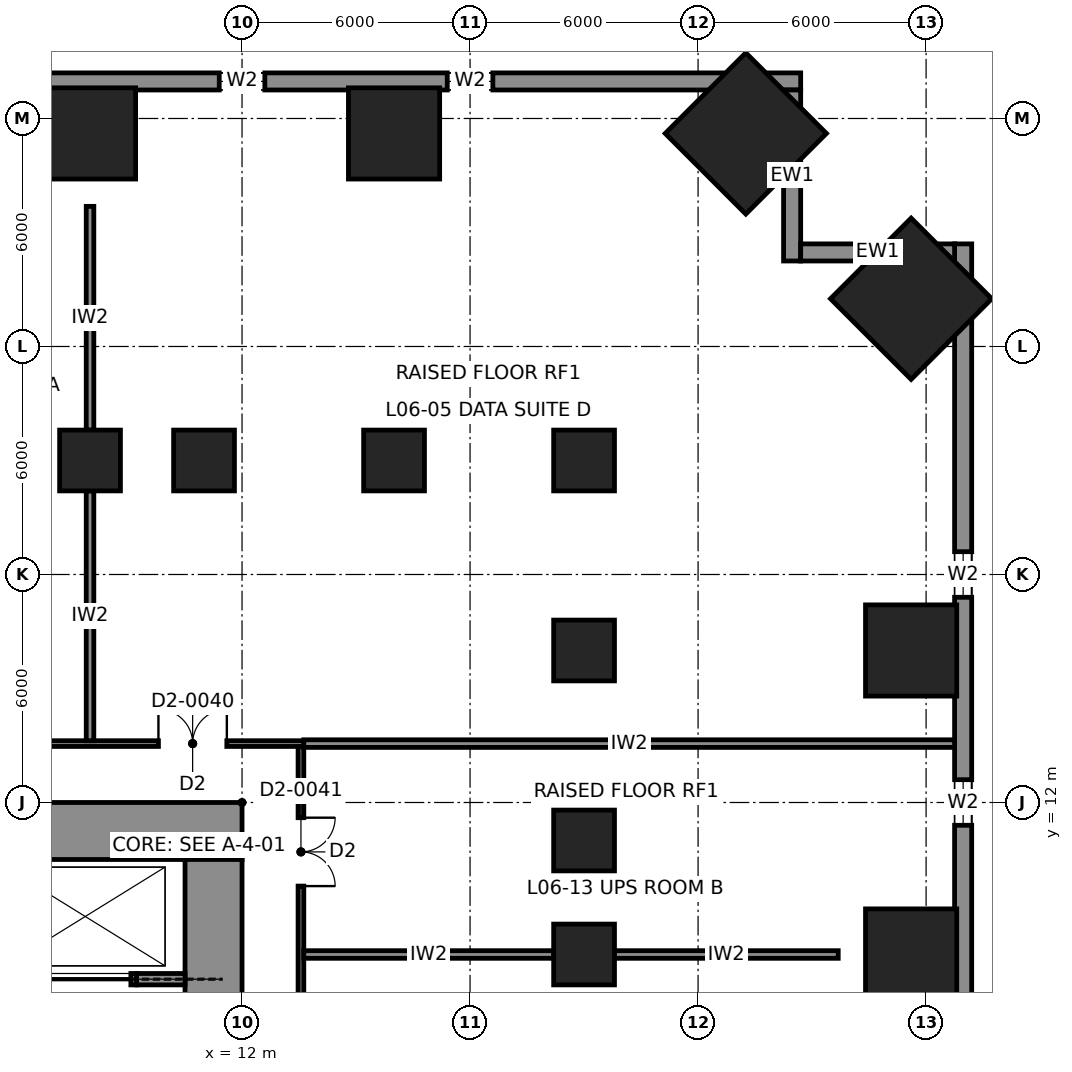
"""IFC4 building model, lengths in metres.
Left out: names, types, materials, properties, quantities, classifications, styles, units other than length and angle.
Written with IfcOpenShell. Run it as: python <this file> out.ifc"""

import sys

from ifc_helpers import new_model, si_unit, direction, frame, frame_2d, origin, origin_2d, place, context, subcontext, project, spatial, rectangle, extrude, element, fill, save


model = new_model("IFC4")
c1 = context("Model", 3, precision=1e-05, world=origin(), true_north=direction((0.0, 1.0)))
c2 = subcontext(c1, "Body", "Model", "MODEL_VIEW")
j1 = project(units=[si_unit("LENGTHUNIT", "METRE"), si_unit("PLANEANGLEUNIT", "RADIAN")], contexts=[c1])
p1 = place(None, origin())
s1 = spatial("IfcSite", under=j1, at=p1, CompositionType="ELEMENT")
p2 = place(p1, origin())
s2 = spatial("IfcBuilding", under=s1, at=p2, CompositionType="ELEMENT")
p3 = place(p2, frame((0.0, 0.0, 32.0)))
s3 = spatial("IfcBuildingStorey", under=s2, at=p3, CompositionType="ELEMENT", Elevation=32.0)
for number, where, z_axis, x_axis in (
    (1, (25.256, 29.606, 0.0), (-0.04, -0.04, 0.998), (0.707, -0.707, 0.0)),
    (2, (29.606, 25.256, 0.0), (-0.04, -0.04, 0.998), (0.707, -0.707, 0.0)),
):
    element("IfcColumn", number, at=place(p3, frame(where, z_axis=z_axis, x_axis=x_axis)), inside=s3, PredefinedType="COLUMN", context=c2, shape_type="SweptSolid", body=[
        extrude(rectangle(XDim=3.0, YDim=3.0, at=origin_2d()), origin(), (0.0, 0.0, 1.0), 5.509),
    ])
for number, where, z_axis, x_axis in (
    (3, (8.0, 29.606, 0.0), (0.0, -0.04, 0.999), (1.0, 0.0, 0.0)),
    (4, (16.0, 29.606, 0.0), (0.0, -0.04, 0.999), (1.0, 0.0, 0.0)),
    (5, (29.606, 8.0, 0.0), (-0.04, 0.0, 0.999), (0.0, -1.0, 0.0)),
    (6, (29.606, 16.0, 0.0), (-0.04, 0.0, 0.999), (0.0, -1.0, 0.0)),
):
    element("IfcColumn", number, at=place(p3, frame(where, z_axis=z_axis, x_axis=x_axis)), inside=s3, PredefinedType="COLUMN", context=c2, shape_type="SweptSolid", body=[
        extrude(rectangle(XDim=2.4, YDim=2.4, at=origin_2d()), origin(), (0.0, 0.0, 1.0), 5.504),
    ])
for number, where, z_axis, x_axis in (
    (7, (8.0, 21.0, 0.0), (0.0, 0.0, 1.0), (1.0, 0.0, 0.0)),
    (8, (11.0, 21.0, 0.0), (0.0, 0.0, 1.0), (1.0, 0.0, 0.0)),
    (9, (16.0, 21.0, 0.0), (0.0, 0.0, 1.0), (1.0, 0.0, 0.0)),
    (10, (21.0, 8.0, 0.0), (0.0, 0.0, 1.0), (1.0, 0.0, 0.0)),
    (11, (21.0, 11.0, 0.0), (0.0, 0.0, 1.0), (1.0, 0.0, 0.0)),
    (12, (21.0, 16.0, 0.0), (0.0, 0.0, 1.0), (1.0, 0.0, 0.0)),
    (13, (21.0, 21.0, 0.0), (0.0, 0.0, 1.0), (1.0, 0.0, 0.0)),
):
    element("IfcColumn", number, at=place(p3, frame(where, z_axis=z_axis, x_axis=x_axis)), inside=s3, PredefinedType="COLUMN", context=c2, shape_type="SweptSolid", body=[
        extrude(rectangle(XDim=1.6, YDim=1.6, at=origin_2d()), origin(), (0.0, 0.0, 1.0), 5.5),
    ])
p4 = place(p3, frame((-12.0, 11.25, 0.0), z_axis=(0.0, 0.0, 1.0), x_axis=(1.0, 0.0, 0.0)))
e14 = element("IfcWall", 14, at=p4, inside=s3, PredefinedType="SHEAR", context=c2, shape_type="SweptSolid", body=[
    extrude(rectangle(XDim=24.0, YDim=1.5, at=frame_2d((12.0, 0.0))), origin(), (0.0, 0.0, 1.0), 5.5),
])
p5 = place(p3, frame((11.25, 10.5, 0.0), z_axis=(0.0, 0.0, 1.0), x_axis=(0.0, -1.0, 0.0)))
e15 = element("IfcWall", 15, at=p5, inside=s3, PredefinedType="SHEAR", context=c2, shape_type="SweptSolid", body=[
    extrude(rectangle(XDim=21.0, YDim=1.5, at=frame_2d((10.5, 0.0))), origin(), (0.0, 0.0, 1.0), 5.5),
])
p6 = place(p5, frame((3.7, 0.0, 0.0)))
e16 = element("IfcOpeningElement", 16, at=p6, cuts=e15, PredefinedType="OPENING", context=c2, shape_type="SweptSolid", body=[
    extrude(rectangle(XDim=1.2, YDim=2.3, at=frame_2d((0.6, 1.15))), frame((0.0, 0.76, 0.0), z_axis=(0.0, -1.0, 0.0), x_axis=(1.0, 0.0, 0.0)), (0.0, 0.0, 1.0), 1.52),
])
p7 = place(p5, frame((16.1, 0.0, 0.0)))
e17 = element("IfcOpeningElement", 17, at=p7, cuts=e15, PredefinedType="OPENING", context=c2, shape_type="SweptSolid", body=[
    extrude(rectangle(XDim=1.2, YDim=2.3, at=frame_2d((0.6, 1.15))), frame((0.0, 0.76, 0.0), z_axis=(0.0, -1.0, 0.0), x_axis=(1.0, 0.0, 0.0)), (0.0, 0.0, 1.0), 1.52),
])
p8 = place(p3, frame((9.225, 7.35, 0.0), z_axis=(0.0, 0.0, 1.0), x_axis=(1.0, 0.0, 0.0)))
e18 = element("IfcWall", 18, at=p8, inside=s3, PredefinedType="SHEAR", context=c2, shape_type="SweptSolid", body=[
    extrude(rectangle(XDim=1.275, YDim=0.3, at=frame_2d((0.637, 0.0))), origin(), (0.0, 0.0, 1.0), 5.5),
])
p9 = place(p3, frame((6.525, 7.35, 0.0), z_axis=(0.0, 0.0, 1.0), x_axis=(1.0, 0.0, 0.0)))
e19 = element("IfcWall", 19, at=p9, inside=s3, PredefinedType="PARTITIONING", context=c2, shape_type="SweptSolid", body=[
    extrude(rectangle(XDim=2.7, YDim=0.3, at=frame_2d((1.35, 0.0))), origin(), (0.0, 0.0, 1.0), 5.5),
])
p10 = place(p9, frame((0.15, 0.0, 0.0)))
e20 = element("IfcOpeningElement", 20, at=p10, cuts=e19, PredefinedType="OPENING", context=c2, shape_type="SweptSolid", body=[
    extrude(rectangle(XDim=2.4, YDim=2.3, at=frame_2d((1.2, 1.15))), frame((0.0, 0.16, 0.0), z_axis=(0.0, -1.0, 0.0), x_axis=(1.0, 0.0, 0.0)), (0.0, 0.0, 1.0), 0.32),
])
p11 = place(p3, frame((26.7, 30.975, 0.0), z_axis=(0.0, 0.0, 1.0), x_axis=(-1.0, 0.0, 0.0)))
e21 = element("IfcWall", 21, at=p11, inside=s3, PredefinedType="SOLIDWALL", context=c2, shape_type="SweptSolid", body=[
    extrude(rectangle(XDim=53.4, YDim=0.45, at=frame_2d((26.7, 0.0))), origin(), (0.0, 0.0, 1.0), 5.3),
])
p12 = place(p11, frame((8.1, 0.0, 0.9)))
e22 = element("IfcOpeningElement", 22, at=p12, cuts=e21, PredefinedType="OPENING", context=c2, shape_type="SweptSolid", body=[
    extrude(rectangle(XDim=1.2, YDim=2.0, at=frame_2d((0.6, 1.0))), frame((0.0, 0.235, 0.0), z_axis=(0.0, -1.0, 0.0), x_axis=(1.0, 0.0, 0.0)), (0.0, 0.0, 1.0), 0.47),
])
p13 = place(p11, frame((14.1, 0.0, 0.9)))
e23 = element("IfcOpeningElement", 23, at=p13, cuts=e21, PredefinedType="OPENING", context=c2, shape_type="SweptSolid", body=[
    extrude(rectangle(XDim=1.2, YDim=2.0, at=frame_2d((0.6, 1.0))), frame((0.0, 0.235, 0.0), z_axis=(0.0, -1.0, 0.0), x_axis=(1.0, 0.0, 0.0)), (0.0, 0.0, 1.0), 0.47),
])
p14 = place(p11, frame((20.1, 0.0, 0.9)))
e24 = element("IfcOpeningElement", 24, at=p14, cuts=e21, PredefinedType="OPENING", context=c2, shape_type="SweptSolid", body=[
    extrude(rectangle(XDim=1.2, YDim=2.0, at=frame_2d((0.6, 1.0))), frame((0.0, 0.235, 0.0), z_axis=(0.0, -1.0, 0.0), x_axis=(1.0, 0.0, 0.0)), (0.0, 0.0, 1.0), 0.47),
])
p15 = place(p11, frame((32.1, 0.0, 0.9)))
e25 = element("IfcOpeningElement", 25, at=p15, cuts=e21, PredefinedType="OPENING", context=c2, shape_type="SweptSolid", body=[
    extrude(rectangle(XDim=1.2, YDim=2.0, at=frame_2d((0.6, 1.0))), frame((0.0, 0.235, 0.0), z_axis=(0.0, -1.0, 0.0), x_axis=(1.0, 0.0, 0.0)), (0.0, 0.0, 1.0), 0.47),
])
p16 = place(p11, frame((38.1, 0.0, 0.9)))
e26 = element("IfcOpeningElement", 26, at=p16, cuts=e21, PredefinedType="OPENING", context=c2, shape_type="SweptSolid", body=[
    extrude(rectangle(XDim=1.2, YDim=2.0, at=frame_2d((0.6, 1.0))), frame((0.0, 0.235, 0.0), z_axis=(0.0, -1.0, 0.0), x_axis=(1.0, 0.0, 0.0)), (0.0, 0.0, 1.0), 0.47),
])
p17 = place(p11, frame((44.1, 0.0, 0.9)))
e27 = element("IfcOpeningElement", 27, at=p17, cuts=e21, PredefinedType="OPENING", context=c2, shape_type="SweptSolid", body=[
    extrude(rectangle(XDim=1.2, YDim=2.0, at=frame_2d((0.6, 1.0))), frame((0.0, 0.235, 0.0), z_axis=(0.0, -1.0, 0.0), x_axis=(1.0, 0.0, 0.0)), (0.0, 0.0, 1.0), 0.47),
])
p18 = place(p3, frame((30.975, -26.7, 0.0), z_axis=(0.0, 0.0, 1.0), x_axis=(0.0, 1.0, 0.0)))
e28 = element("IfcWall", 28, at=p18, inside=s3, PredefinedType="SOLIDWALL", context=c2, shape_type="SweptSolid", body=[
    extrude(rectangle(XDim=53.4, YDim=0.45, at=frame_2d((26.7, 0.0))), origin(), (0.0, 0.0, 1.0), 5.3),
])
p19 = place(p18, frame((8.1, 0.0, 0.9)))
e29 = element("IfcOpeningElement", 29, at=p19, cuts=e28, PredefinedType="OPENING", context=c2, shape_type="SweptSolid", body=[
    extrude(rectangle(XDim=1.2, YDim=2.0, at=frame_2d((0.6, 1.0))), frame((0.0, 0.235, 0.0), z_axis=(0.0, -1.0, 0.0), x_axis=(1.0, 0.0, 0.0)), (0.0, 0.0, 1.0), 0.47),
])
p20 = place(p18, frame((14.1, 0.0, 0.9)))
e30 = element("IfcOpeningElement", 30, at=p20, cuts=e28, PredefinedType="OPENING", context=c2, shape_type="SweptSolid", body=[
    extrude(rectangle(XDim=1.2, YDim=2.0, at=frame_2d((0.6, 1.0))), frame((0.0, 0.235, 0.0), z_axis=(0.0, -1.0, 0.0), x_axis=(1.0, 0.0, 0.0)), (0.0, 0.0, 1.0), 0.47),
])
p21 = place(p18, frame((20.1, 0.0, 0.9)))
e31 = element("IfcOpeningElement", 31, at=p21, cuts=e28, PredefinedType="OPENING", context=c2, shape_type="SweptSolid", body=[
    extrude(rectangle(XDim=1.2, YDim=2.0, at=frame_2d((0.6, 1.0))), frame((0.0, 0.235, 0.0), z_axis=(0.0, -1.0, 0.0), x_axis=(1.0, 0.0, 0.0)), (0.0, 0.0, 1.0), 0.47),
])
p22 = place(p18, frame((32.1, 0.0, 0.9)))
e32 = element("IfcOpeningElement", 32, at=p22, cuts=e28, PredefinedType="OPENING", context=c2, shape_type="SweptSolid", body=[
    extrude(rectangle(XDim=1.2, YDim=2.0, at=frame_2d((0.6, 1.0))), frame((0.0, 0.235, 0.0), z_axis=(0.0, -1.0, 0.0), x_axis=(1.0, 0.0, 0.0)), (0.0, 0.0, 1.0), 0.47),
])
p23 = place(p18, frame((38.1, 0.0, 0.9)))
e33 = element("IfcOpeningElement", 33, at=p23, cuts=e28, PredefinedType="OPENING", context=c2, shape_type="SweptSolid", body=[
    extrude(rectangle(XDim=1.2, YDim=2.0, at=frame_2d((0.6, 1.0))), frame((0.0, 0.235, 0.0), z_axis=(0.0, -1.0, 0.0), x_axis=(1.0, 0.0, 0.0)), (0.0, 0.0, 1.0), 0.47),
])
p24 = place(p18, frame((44.1, 0.0, 0.9)))
e34 = element("IfcOpeningElement", 34, at=p24, cuts=e28, PredefinedType="OPENING", context=c2, shape_type="SweptSolid", body=[
    extrude(rectangle(XDim=1.2, YDim=2.0, at=frame_2d((0.6, 1.0))), frame((0.0, 0.235, 0.0), z_axis=(0.0, -1.0, 0.0), x_axis=(1.0, 0.0, 0.0)), (0.0, 0.0, 1.0), 0.47),
])
p25 = place(p3, frame((26.475, 26.25, 0.0), z_axis=(0.0, 0.0, 1.0), x_axis=(0.0, 1.0, 0.0)))
e35 = element("IfcWall", 35, at=p25, inside=s3, PredefinedType="SOLIDWALL", context=c2, shape_type="SweptSolid", body=[
    extrude(rectangle(XDim=4.5, YDim=0.45, at=frame_2d((2.25, 0.0))), origin(), (0.0, 0.0, 1.0), 5.3),
])
p26 = place(p3, frame((26.7, 26.475, 0.0), z_axis=(0.0, 0.0, 1.0), x_axis=(1.0, 0.0, 0.0)))
e36 = element("IfcWall", 36, at=p26, inside=s3, PredefinedType="SOLIDWALL", context=c2, shape_type="SweptSolid", body=[
    extrude(rectangle(XDim=4.05, YDim=0.45, at=frame_2d((2.025, 0.0))), origin(), (0.0, 0.0, 1.0), 5.3),
])
p27 = place(p3, frame((-13.625, 13.55, 0.0), z_axis=(0.0, 0.0, 1.0), x_axis=(1.0, 0.0, 0.0)))
e37 = element("IfcWall", 37, at=p27, inside=s3, PredefinedType="PARTITIONING", context=c2, shape_type="SweptSolid", body=[
    extrude(rectangle(XDim=27.25, YDim=0.15, at=frame_2d((13.625, 0.0))), origin(), (0.0, 0.0, 1.0), 5.3),
])
p28 = place(p27, frame((2.025, 0.0, 0.0)))
e38 = element("IfcOpeningElement", 38, at=p28, cuts=e37, PredefinedType="OPENING", context=c2, shape_type="SweptSolid", body=[
    extrude(rectangle(XDim=1.8, YDim=2.3, at=frame_2d((0.9, 1.15))), frame((0.0, 0.085, 0.0), z_axis=(0.0, -1.0, 0.0), x_axis=(1.0, 0.0, 0.0)), (0.0, 0.0, 1.0), 0.17),
])
p29 = place(p27, frame((7.225, 0.0, 0.0)))
e39 = element("IfcOpeningElement", 39, at=p29, cuts=e37, PredefinedType="OPENING", context=c2, shape_type="SweptSolid", body=[
    extrude(rectangle(XDim=1.8, YDim=2.3, at=frame_2d((0.9, 1.15))), frame((0.0, 0.085, 0.0), z_axis=(0.0, -1.0, 0.0), x_axis=(1.0, 0.0, 0.0)), (0.0, 0.0, 1.0), 0.17),
])
p30 = place(p27, frame((12.725, 0.0, 0.0)))
e40 = element("IfcOpeningElement", 40, at=p30, cuts=e37, PredefinedType="OPENING", context=c2, shape_type="SweptSolid", body=[
    extrude(rectangle(XDim=1.8, YDim=2.3, at=frame_2d((0.9, 1.15))), frame((0.0, 0.085, 0.0), z_axis=(0.0, -1.0, 0.0), x_axis=(1.0, 0.0, 0.0)), (0.0, 0.0, 1.0), 0.17),
])
p31 = place(p27, frame((18.225, 0.0, 0.0)))
e41 = element("IfcOpeningElement", 41, at=p31, cuts=e37, PredefinedType="OPENING", context=c2, shape_type="SweptSolid", body=[
    extrude(rectangle(XDim=1.8, YDim=2.3, at=frame_2d((0.9, 1.15))), frame((0.0, 0.085, 0.0), z_axis=(0.0, -1.0, 0.0), x_axis=(1.0, 0.0, 0.0)), (0.0, 0.0, 1.0), 0.17),
])
p32 = place(p27, frame((23.425, 0.0, 0.0)))
e42 = element("IfcOpeningElement", 42, at=p32, cuts=e37, PredefinedType="OPENING", context=c2, shape_type="SweptSolid", body=[
    extrude(rectangle(XDim=1.8, YDim=2.3, at=frame_2d((0.9, 1.15))), frame((0.0, 0.085, 0.0), z_axis=(0.0, -1.0, 0.0), x_axis=(1.0, 0.0, 0.0)), (0.0, 0.0, 1.0), 0.17),
])
p33 = place(p3, frame((13.55, -13.475, 0.0), z_axis=(0.0, 0.0, 1.0), x_axis=(0.0, 1.0, 0.0)))
e43 = element("IfcWall", 43, at=p33, inside=s3, PredefinedType="PARTITIONING", context=c2, shape_type="SweptSolid", body=[
    extrude(rectangle(XDim=26.95, YDim=0.15, at=frame_2d((13.475, 0.0))), origin(), (0.0, 0.0, 1.0), 5.3),
])
p34 = place(p33, frame((1.875, 0.0, 0.0)))
e44 = element("IfcOpeningElement", 44, at=p34, cuts=e43, PredefinedType="OPENING", context=c2, shape_type="SweptSolid", body=[
    extrude(rectangle(XDim=1.8, YDim=2.3, at=frame_2d((0.9, 1.15))), frame((0.0, 0.085, 0.0), z_axis=(0.0, -1.0, 0.0), x_axis=(1.0, 0.0, 0.0)), (0.0, 0.0, 1.0), 0.17),
])
p35 = place(p33, frame((12.575, 0.0, 0.0)))
e45 = element("IfcOpeningElement", 45, at=p35, cuts=e43, PredefinedType="OPENING", context=c2, shape_type="SweptSolid", body=[
    extrude(rectangle(XDim=1.8, YDim=2.3, at=frame_2d((0.9, 1.15))), frame((0.0, 0.085, 0.0), z_axis=(0.0, -1.0, 0.0), x_axis=(1.0, 0.0, 0.0)), (0.0, 0.0, 1.0), 0.17),
])
p36 = place(p33, frame((23.275, 0.0, 0.0)))
e46 = element("IfcOpeningElement", 46, at=p36, cuts=e43, PredefinedType="OPENING", context=c2, shape_type="SweptSolid", body=[
    extrude(rectangle(XDim=1.8, YDim=2.3, at=frame_2d((0.9, 1.15))), frame((0.0, 0.085, 0.0), z_axis=(0.0, -1.0, 0.0), x_axis=(1.0, 0.0, 0.0)), (0.0, 0.0, 1.0), 0.17),
])
p37 = place(p3, frame((13.625, 13.55, 0.0), z_axis=(0.0, 0.0, 1.0), x_axis=(1.0, 0.0, 0.0)))
e47 = element("IfcWall", 47, at=p37, inside=s3, PredefinedType="PARTITIONING", context=c2, shape_type="SweptSolid", body=[
    extrude(rectangle(XDim=17.125, YDim=0.2, at=frame_2d((8.562, 0.0))), origin(), (0.0, 0.0, 1.0), 5.3),
])
p38 = place(p3, frame((8.0, 13.625, 0.0), z_axis=(0.0, 0.0, 1.0), x_axis=(0.0, 1.0, 0.0)))
e48 = element("IfcWall", 48, at=p38, inside=s3, PredefinedType="PARTITIONING", context=c2, shape_type="SweptSolid", body=[
    extrude(rectangle(XDim=6.575, YDim=0.2, at=frame_2d((3.288, 0.0))), origin(), (0.0, 0.0, 1.0), 4.731),
])
p39 = place(p3, frame((8.0, 21.8, 0.0), z_axis=(0.0, 0.0, 1.0), x_axis=(0.0, 1.0, 0.0)))
e49 = element("IfcWall", 49, at=p39, inside=s3, PredefinedType="PARTITIONING", context=c2, shape_type="SweptSolid", body=[
    extrude(rectangle(XDim=5.887, YDim=0.2, at=frame_2d((2.944, 0.0))), origin(), (0.0, 0.0, 1.0), 4.731),
])
p40 = place(p3, frame((13.625, 8.0, 0.0), z_axis=(0.0, 0.0, 1.0), x_axis=(1.0, 0.0, 0.0)))
e50 = element("IfcWall", 50, at=p40, inside=s3, PredefinedType="PARTITIONING", context=c2, shape_type="SweptSolid", body=[
    extrude(rectangle(XDim=6.575, YDim=0.2, at=frame_2d((3.288, 0.0))), origin(), (0.0, 0.0, 1.0), 4.731),
])
p41 = place(p3, frame((21.8, 8.0, 0.0), z_axis=(0.0, 0.0, 1.0), x_axis=(1.0, 0.0, 0.0)))
e51 = element("IfcWall", 51, at=p41, inside=s3, PredefinedType="PARTITIONING", context=c2, shape_type="SweptSolid", body=[
    extrude(rectangle(XDim=5.887, YDim=0.2, at=frame_2d((2.944, 0.0))), origin(), (0.0, 0.0, 1.0), 4.731),
])
p42 = place(p12, origin())
e52 = element("IfcWindow", 52, at=p42, inside=s3, PartitioningType="SINGLE_PANEL", PredefinedType="WINDOW", context=c2, shape_type="SweptSolid", body=[
    extrude(rectangle(XDim=1.2, YDim=2.0, at=frame_2d((0.6, 1.0))), frame((0.0, 0.03, 0.0), z_axis=(0.0, -1.0, 0.0), x_axis=(1.0, 0.0, 0.0)), (0.0, 0.0, 1.0), 0.06),
])
fill(e22, e52)
p43 = place(p13, origin())
e53 = element("IfcWindow", 53, at=p43, inside=s3, PartitioningType="SINGLE_PANEL", PredefinedType="WINDOW", context=c2, shape_type="SweptSolid", body=[
    extrude(rectangle(XDim=1.2, YDim=2.0, at=frame_2d((0.6, 1.0))), frame((0.0, 0.03, 0.0), z_axis=(0.0, -1.0, 0.0), x_axis=(1.0, 0.0, 0.0)), (0.0, 0.0, 1.0), 0.06),
])
fill(e23, e53)
p44 = place(p23, origin())
e54 = element("IfcWindow", 54, at=p44, inside=s3, PartitioningType="SINGLE_PANEL", PredefinedType="WINDOW", context=c2, shape_type="SweptSolid", body=[
    extrude(rectangle(XDim=1.2, YDim=2.0, at=frame_2d((0.6, 1.0))), frame((0.0, 0.03, 0.0), z_axis=(0.0, -1.0, 0.0), x_axis=(1.0, 0.0, 0.0)), (0.0, 0.0, 1.0), 0.06),
])
fill(e33, e54)
p45 = place(p24, origin())
e55 = element("IfcWindow", 55, at=p45, inside=s3, PartitioningType="SINGLE_PANEL", PredefinedType="WINDOW", context=c2, shape_type="SweptSolid", body=[
    extrude(rectangle(XDim=1.2, YDim=2.0, at=frame_2d((0.6, 1.0))), frame((0.0, 0.03, 0.0), z_axis=(0.0, -1.0, 0.0), x_axis=(1.0, 0.0, 0.0)), (0.0, 0.0, 1.0), 0.06),
])
fill(e34, e55)
p46 = place(p32, origin())
e56 = element("IfcDoor", 56, at=p46, inside=s3, OperationType="DOUBLE_DOOR_DOUBLE_SWING", PredefinedType="DOOR", context=c2, shape_type="SweptSolid", body=[
    extrude(rectangle(XDim=1.8, YDim=2.3, at=frame_2d((0.9, 1.15))), frame((0.0, 0.025, 0.0), z_axis=(0.0, -1.0, 0.0), x_axis=(1.0, 0.0, 0.0)), (0.0, 0.0, 1.0), 0.05),
])
fill(e42, e56)
p47 = place(p36, frame((1.8, 0.0, 0.0), z_axis=(0.0, 0.0, 1.0), x_axis=(-1.0, 0.0, 0.0)))
e57 = element("IfcDoor", 57, at=p47, inside=s3, OperationType="DOUBLE_DOOR_DOUBLE_SWING", PredefinedType="DOOR", context=c2, shape_type="SweptSolid", body=[
    extrude(rectangle(XDim=1.8, YDim=2.3, at=frame_2d((0.9, 1.15))), frame((0.0, 0.025, 0.0), z_axis=(0.0, -1.0, 0.0), x_axis=(1.0, 0.0, 0.0)), (0.0, 0.0, 1.0), 0.05),
])
fill(e46, e57)
p48 = place(p10, frame((2.4, 0.0, 0.0), z_axis=(0.0, 0.0, 1.0), x_axis=(-1.0, 0.0, 0.0)))
e58 = element("IfcDoor", 58, at=p48, inside=s3, OperationType="SLIDING_TO_LEFT", PredefinedType="DOOR", context=c2, shape_type="SweptSolid", body=[
    extrude(rectangle(XDim=2.4, YDim=2.3, at=frame_2d((1.2, 1.15))), frame((0.0, 0.025, 0.0), z_axis=(0.0, -1.0, 0.0), x_axis=(1.0, 0.0, 0.0)), (0.0, 0.0, 1.0), 0.05),
])
fill(e20, e58)
save(model, sys.argv[1])
